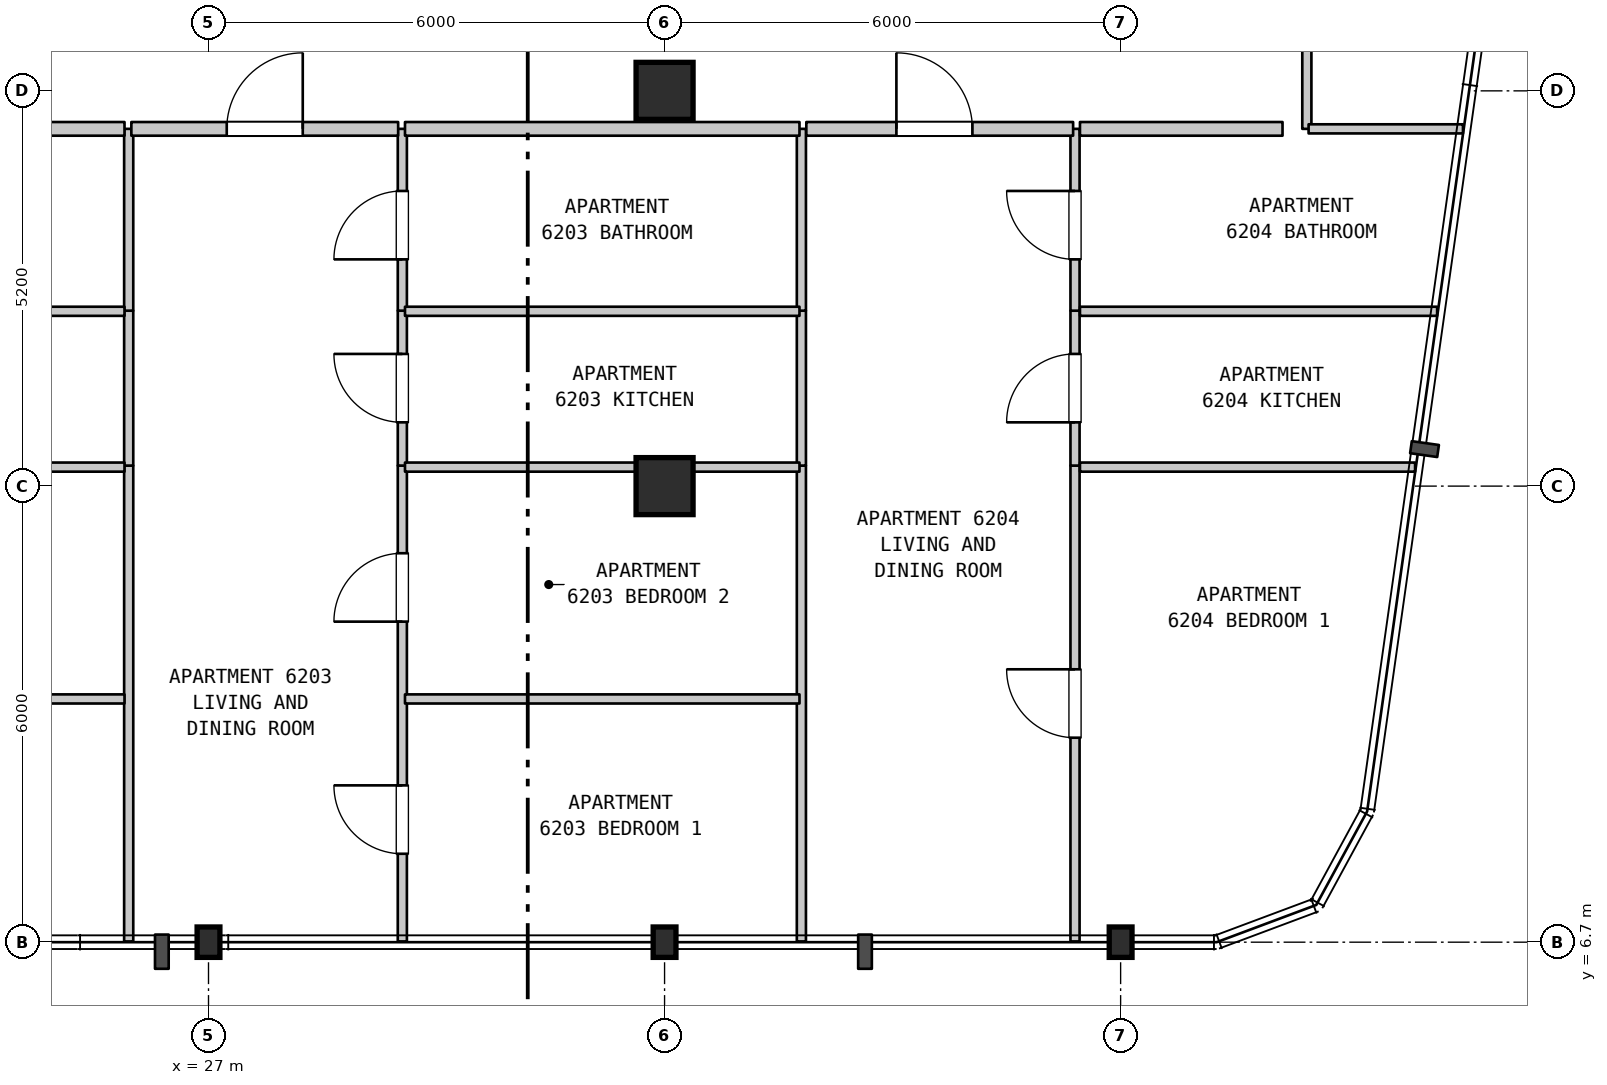
"""IFC4 building model, lengths in metres.
Left out: names, types, materials, properties, quantities, classifications, styles, units other than length and angle.
Written with IfcOpenShell. Run it as: python <this file> out.ifc"""

import sys

from ifc_helpers import new_model, si_unit, direction, frame, frame_2d, origin, origin_2d, place, context, subcontext, project, spatial, rectangle, i_section, extrude, element, fill, save


model = new_model("IFC4")
c1 = context("Model", 3, precision=1e-05, world=origin(), true_north=direction((0.0, 1.0)))
c2 = subcontext(c1, "Body", "Model", "MODEL_VIEW")
j1 = project(units=[si_unit("LENGTHUNIT", "METRE"), si_unit("PLANEANGLEUNIT", "RADIAN")], contexts=[c1])
p1 = place(None, origin())
s1 = spatial("IfcSite", under=j1, at=p1, CompositionType="ELEMENT")
p2 = place(p1, origin())
s2 = spatial("IfcBuilding", under=s1, at=p2, CompositionType="ELEMENT")
p3 = place(p2, frame((0.0, 0.0, 251.0)))
s3 = spatial("IfcBuildingStorey", under=s2, at=p3, CompositionType="ELEMENT", Elevation=251.0)
for number, where, z_axis, x_axis in (
    (1, (27.0, 6.7, 0.0), (0.0, 0.0, 1.0), (1.0, 0.0, 0.0)),
    (2, (33.0, 6.7, 0.0), (0.0, 0.0, 1.0), (1.0, 0.0, 0.0)),
):
    element("IfcColumn", number, at=place(p3, frame(where, z_axis=z_axis, x_axis=x_axis)), inside=s3, PredefinedType="COLUMN", context=c2, shape_type="SweptSolid", body=[
        extrude(i_section(OverallWidth=0.3, OverallDepth=0.4, WebThickness=0.013, FlangeThickness=0.024, FilletRadius=0.027, at=origin_2d()), origin(), (0.0, 0.0, 1.0), 3.7),
    ])
for number, where, z_axis, x_axis in (
    (3, (33.0, 12.7, 0.0), (0.0, 0.0, 1.0), (1.0, 0.0, 0.0)),
    (4, (33.0, 17.9, 0.0), (0.0, 0.0, 1.0), (1.0, 0.0, 0.0)),
):
    element("IfcColumn", number, at=place(p3, frame(where, z_axis=z_axis, x_axis=x_axis)), inside=s3, PredefinedType="COLUMN", context=c2, shape_type="SweptSolid", body=[
        extrude(rectangle(XDim=0.75, YDim=0.75, at=origin_2d()), origin(), (0.0, 0.0, 1.0), 3.7),
    ])
p4 = place(p3, frame((39.0, 6.7, 0.0), z_axis=(0.0, 0.0, 1.0), x_axis=(1.0, 0.0, 0.0)))
e5 = element("IfcColumn", 5, at=p4, inside=s3, PredefinedType="COLUMN", context=c2, shape_type="SweptSolid", body=[
    extrude(i_section(OverallWidth=0.3, OverallDepth=0.4, WebThickness=0.013, FlangeThickness=0.024, FilletRadius=0.027, at=origin_2d()), origin(), (0.0, 0.0, 1.0), 3.7),
])
p5 = place(p3, frame((25.95, 6.71, 0.0), z_axis=(0.0, 0.0, 1.0), x_axis=(0.0, 1.0, 0.0)))
e6 = element("IfcWall", 6, at=p5, inside=s3, PredefinedType="PARTITIONING", context=c2, shape_type="SweptSolid", body=[
    extrude(rectangle(XDim=6.26, YDim=0.12, at=frame_2d((3.13, 0.0))), origin(), (0.0, 0.0, 1.0), 3.39),
])
p6 = place(p3, frame((25.95, 12.97, 0.0), z_axis=(0.0, 0.0, 1.0), x_axis=(0.0, 1.0, 0.0)))
e7 = element("IfcWall", 7, at=p6, inside=s3, PredefinedType="PARTITIONING", context=c2, shape_type="SweptSolid", body=[
    extrude(rectangle(XDim=2.038, YDim=0.12, at=frame_2d((1.019, 0.0))), origin(), (0.0, 0.0, 1.0), 3.39),
])
p7 = place(p3, frame((25.95, 15.008, 0.0), z_axis=(0.0, 0.0, 1.0), x_axis=(0.0, 1.0, 0.0)))
e8 = element("IfcWall", 8, at=p7, inside=s3, PredefinedType="PARTITIONING", context=c2, shape_type="SweptSolid", body=[
    extrude(rectangle(XDim=2.392, YDim=0.12, at=frame_2d((1.196, 0.0))), origin(), (0.0, 0.0, 1.0), 3.39),
])
p8 = place(p3, frame((29.55, 6.71, 0.0), z_axis=(0.0, 0.0, 1.0), x_axis=(0.0, 1.0, 0.0)))
e9 = element("IfcWall", 9, at=p8, inside=s3, PredefinedType="PARTITIONING", context=c2, shape_type="SweptSolid", body=[
    extrude(rectangle(XDim=6.26, YDim=0.12, at=frame_2d((3.13, 0.0))), origin(), (0.0, 0.0, 1.0), 3.39),
])
p9 = place(p8, frame((1.153, 0.0, 0.0)))
e10 = element("IfcOpeningElement", 10, at=p9, cuts=e9, PredefinedType="OPENING", context=c2, shape_type="SweptSolid", body=[
    extrude(rectangle(XDim=0.9, YDim=2.15, at=frame_2d((0.45, 1.075))), frame((0.0, 0.07, 0.0), z_axis=(0.0, -1.0, 0.0), x_axis=(1.0, 0.0, 0.0)), (0.0, 0.0, 1.0), 0.14),
])
p10 = place(p8, frame((4.207, 0.0, 0.0)))
e11 = element("IfcOpeningElement", 11, at=p10, cuts=e9, PredefinedType="OPENING", context=c2, shape_type="SweptSolid", body=[
    extrude(rectangle(XDim=0.9, YDim=2.15, at=frame_2d((0.45, 1.075))), frame((0.0, 0.07, 0.0), z_axis=(0.0, -1.0, 0.0), x_axis=(1.0, 0.0, 0.0)), (0.0, 0.0, 1.0), 0.14),
])
p11 = place(p3, frame((29.55, 12.97, 0.0), z_axis=(0.0, 0.0, 1.0), x_axis=(0.0, 1.0, 0.0)))
e12 = element("IfcWall", 12, at=p11, inside=s3, PredefinedType="PARTITIONING", context=c2, shape_type="SweptSolid", body=[
    extrude(rectangle(XDim=2.038, YDim=0.12, at=frame_2d((1.019, 0.0))), origin(), (0.0, 0.0, 1.0), 3.39),
])
p12 = place(p11, frame((0.569, 0.0, 0.0)))
e13 = element("IfcOpeningElement", 13, at=p12, cuts=e12, PredefinedType="OPENING", context=c2, shape_type="SweptSolid", body=[
    extrude(rectangle(XDim=0.9, YDim=2.15, at=frame_2d((0.45, 1.075))), frame((0.0, 0.07, 0.0), z_axis=(0.0, -1.0, 0.0), x_axis=(1.0, 0.0, 0.0)), (0.0, 0.0, 1.0), 0.14),
])
p13 = place(p3, frame((29.55, 15.008, 0.0), z_axis=(0.0, 0.0, 1.0), x_axis=(0.0, 1.0, 0.0)))
e14 = element("IfcWall", 14, at=p13, inside=s3, PredefinedType="PARTITIONING", context=c2, shape_type="SweptSolid", body=[
    extrude(rectangle(XDim=2.392, YDim=0.12, at=frame_2d((1.196, 0.0))), origin(), (0.0, 0.0, 1.0), 3.39),
])
p14 = place(p13, frame((0.675, 0.0, 0.0)))
e15 = element("IfcOpeningElement", 15, at=p14, cuts=e14, PredefinedType="OPENING", context=c2, shape_type="SweptSolid", body=[
    extrude(rectangle(XDim=0.9, YDim=2.1, at=frame_2d((0.45, 1.05))), frame((0.0, 0.07, 0.0), z_axis=(0.0, -1.0, 0.0), x_axis=(1.0, 0.0, 0.0)), (0.0, 0.0, 1.0), 0.14),
])
p15 = place(p3, frame((34.8, 6.71, 0.0), z_axis=(0.0, 0.0, 1.0), x_axis=(0.0, 1.0, 0.0)))
e16 = element("IfcWall", 16, at=p15, inside=s3, PredefinedType="PARTITIONING", context=c2, shape_type="SweptSolid", body=[
    extrude(rectangle(XDim=6.26, YDim=0.12, at=frame_2d((3.13, 0.0))), origin(), (0.0, 0.0, 1.0), 3.39),
])
p16 = place(p3, frame((34.8, 12.97, 0.0), z_axis=(0.0, 0.0, 1.0), x_axis=(0.0, 1.0, 0.0)))
e17 = element("IfcWall", 17, at=p16, inside=s3, PredefinedType="PARTITIONING", context=c2, shape_type="SweptSolid", body=[
    extrude(rectangle(XDim=2.038, YDim=0.12, at=frame_2d((1.019, 0.0))), origin(), (0.0, 0.0, 1.0), 3.39),
])
p17 = place(p3, frame((34.8, 15.008, 0.0), z_axis=(0.0, 0.0, 1.0), x_axis=(0.0, 1.0, 0.0)))
e18 = element("IfcWall", 18, at=p17, inside=s3, PredefinedType="PARTITIONING", context=c2, shape_type="SweptSolid", body=[
    extrude(rectangle(XDim=2.392, YDim=0.12, at=frame_2d((1.196, 0.0))), origin(), (0.0, 0.0, 1.0), 3.39),
])
p18 = place(p3, frame((38.4, 6.71, 0.0), z_axis=(0.0, 0.0, 1.0), x_axis=(0.0, 1.0, 0.0)))
e19 = element("IfcWall", 19, at=p18, inside=s3, PredefinedType="PARTITIONING", context=c2, shape_type="SweptSolid", body=[
    extrude(rectangle(XDim=6.26, YDim=0.12, at=frame_2d((3.13, 0.0))), origin(), (0.0, 0.0, 1.0), 3.39),
])
p19 = place(p18, frame((2.68, 0.0, 0.0)))
e20 = element("IfcOpeningElement", 20, at=p19, cuts=e19, PredefinedType="OPENING", context=c2, shape_type="SweptSolid", body=[
    extrude(rectangle(XDim=0.9, YDim=2.15, at=frame_2d((0.45, 1.075))), frame((0.0, 0.07, 0.0), z_axis=(0.0, -1.0, 0.0), x_axis=(1.0, 0.0, 0.0)), (0.0, 0.0, 1.0), 0.14),
])
p20 = place(p3, frame((38.4, 12.97, 0.0), z_axis=(0.0, 0.0, 1.0), x_axis=(0.0, 1.0, 0.0)))
e21 = element("IfcWall", 21, at=p20, inside=s3, PredefinedType="PARTITIONING", context=c2, shape_type="SweptSolid", body=[
    extrude(rectangle(XDim=2.038, YDim=0.12, at=frame_2d((1.019, 0.0))), origin(), (0.0, 0.0, 1.0), 3.39),
])
p21 = place(p20, frame((0.569, 0.0, 0.0)))
e22 = element("IfcOpeningElement", 22, at=p21, cuts=e21, PredefinedType="OPENING", context=c2, shape_type="SweptSolid", body=[
    extrude(rectangle(XDim=0.9, YDim=2.15, at=frame_2d((0.45, 1.075))), frame((0.0, 0.07, 0.0), z_axis=(0.0, -1.0, 0.0), x_axis=(1.0, 0.0, 0.0)), (0.0, 0.0, 1.0), 0.14),
])
p22 = place(p3, frame((38.4, 15.008, 0.0), z_axis=(0.0, 0.0, 1.0), x_axis=(0.0, 1.0, 0.0)))
e23 = element("IfcWall", 23, at=p22, inside=s3, PredefinedType="PARTITIONING", context=c2, shape_type="SweptSolid", body=[
    extrude(rectangle(XDim=2.392, YDim=0.12, at=frame_2d((1.196, 0.0))), origin(), (0.0, 0.0, 1.0), 3.39),
])
p23 = place(p22, frame((0.675, 0.0, 0.0)))
e24 = element("IfcOpeningElement", 24, at=p23, cuts=e23, PredefinedType="OPENING", context=c2, shape_type="SweptSolid", body=[
    extrude(rectangle(XDim=0.9, YDim=2.1, at=frame_2d((0.45, 1.05))), frame((0.0, 0.07, 0.0), z_axis=(0.0, -1.0, 0.0), x_axis=(1.0, 0.0, 0.0)), (0.0, 0.0, 1.0), 0.14),
])
p24 = place(p3, frame((41.45, 17.4, 0.0), z_axis=(0.0, 0.0, 1.0), x_axis=(0.0, 1.0, 0.0)))
e25 = element("IfcWall", 25, at=p24, inside=s3, PredefinedType="PARTITIONING", context=c2, shape_type="SweptSolid", body=[
    extrude(rectangle(XDim=2.099, YDim=0.12, at=frame_2d((1.05, 0.0))), origin(), (0.0, 0.0, 1.0), 3.39),
])
p25 = place(p3, frame((21.045, 9.9, 0.0), z_axis=(0.0, 0.0, 1.0), x_axis=(1.0, 0.0, 0.0)))
e26 = element("IfcWall", 26, at=p25, inside=s3, PredefinedType="PARTITIONING", context=c2, shape_type="SweptSolid", body=[
    extrude(rectangle(XDim=4.85, YDim=0.12, at=frame_2d((2.425, 0.0))), origin(), (0.0, 0.0, 1.0), 3.39),
])
p26 = place(p3, frame((29.585, 9.9, 0.0), z_axis=(0.0, 0.0, 1.0), x_axis=(1.0, 0.0, 0.0)))
e27 = element("IfcWall", 27, at=p26, inside=s3, PredefinedType="PARTITIONING", context=c2, shape_type="SweptSolid", body=[
    extrude(rectangle(XDim=5.19, YDim=0.12, at=frame_2d((2.595, 0.0))), origin(), (0.0, 0.0, 1.0), 3.39),
])
p27 = place(p3, frame((21.045, 12.95, 0.0), z_axis=(0.0, 0.0, 1.0), x_axis=(1.0, 0.0, 0.0)))
e28 = element("IfcWall", 28, at=p27, inside=s3, PredefinedType="PARTITIONING", context=c2, shape_type="SweptSolid", body=[
    extrude(rectangle(XDim=4.85, YDim=0.12, at=frame_2d((2.425, 0.0))), origin(), (0.0, 0.0, 1.0), 3.39),
])
p28 = place(p3, frame((29.585, 12.95, 0.0), z_axis=(0.0, 0.0, 1.0), x_axis=(1.0, 0.0, 0.0)))
e29 = element("IfcWall", 29, at=p28, inside=s3, PredefinedType="PARTITIONING", context=c2, shape_type="SweptSolid", body=[
    extrude(rectangle(XDim=5.19, YDim=0.12, at=frame_2d((2.595, 0.0))), origin(), (0.0, 0.0, 1.0), 3.39),
])
p29 = place(p3, frame((38.465, 12.95, 0.0), z_axis=(0.0, 0.0, 1.0), x_axis=(1.0, 0.0, 0.0)))
e30 = element("IfcWall", 30, at=p29, inside=s3, PredefinedType="PARTITIONING", context=c2, shape_type="SweptSolid", body=[
    extrude(rectangle(XDim=4.409, YDim=0.12, at=frame_2d((2.205, 0.0))), origin(), (0.0, 0.0, 1.0), 3.39),
])
p30 = place(p3, frame((21.045, 15.0, 0.0), z_axis=(0.0, 0.0, 1.0), x_axis=(1.0, 0.0, 0.0)))
e31 = element("IfcWall", 31, at=p30, inside=s3, PredefinedType="PARTITIONING", context=c2, shape_type="SweptSolid", body=[
    extrude(rectangle(XDim=4.85, YDim=0.12, at=frame_2d((2.425, 0.0))), origin(), (0.0, 0.0, 1.0), 3.39),
])
p31 = place(p3, frame((29.585, 15.0, 0.0), z_axis=(0.0, 0.0, 1.0), x_axis=(1.0, 0.0, 0.0)))
e32 = element("IfcWall", 32, at=p31, inside=s3, PredefinedType="PARTITIONING", context=c2, shape_type="SweptSolid", body=[
    extrude(rectangle(XDim=5.19, YDim=0.12, at=frame_2d((2.595, 0.0))), origin(), (0.0, 0.0, 1.0), 3.39),
])
p32 = place(p3, frame((38.465, 15.0, 0.0), z_axis=(0.0, 0.0, 1.0), x_axis=(1.0, 0.0, 0.0)))
e33 = element("IfcWall", 33, at=p32, inside=s3, PredefinedType="PARTITIONING", context=c2, shape_type="SweptSolid", body=[
    extrude(rectangle(XDim=4.699, YDim=0.12, at=frame_2d((2.35, 0.0))), origin(), (0.0, 0.0, 1.0), 3.39),
])
p33 = place(p3, frame((21.045, 17.4, 0.0), z_axis=(0.0, 0.0, 1.0), x_axis=(1.0, 0.0, 0.0)))
e34 = element("IfcWall", 34, at=p33, inside=s3, PredefinedType="STANDARD", context=c2, shape_type="SweptSolid", body=[
    extrude(rectangle(XDim=4.85, YDim=0.18, at=frame_2d((2.425, 0.0))), origin(), (0.0, 0.0, 1.0), 3.39),
])
p34 = place(p3, frame((25.985, 17.4, 0.0), z_axis=(0.0, 0.0, 1.0), x_axis=(1.0, 0.0, 0.0)))
e35 = element("IfcWall", 35, at=p34, inside=s3, PredefinedType="STANDARD", context=c2, shape_type="SweptSolid", body=[
    extrude(rectangle(XDim=3.51, YDim=0.18, at=frame_2d((1.755, 0.0))), origin(), (0.0, 0.0, 1.0), 3.39),
])
p35 = place(p34, frame((1.255, 0.0, 0.0)))
e36 = element("IfcOpeningElement", 36, at=p35, cuts=e35, PredefinedType="OPENING", context=c2, shape_type="SweptSolid", body=[
    extrude(rectangle(XDim=1.0, YDim=2.15, at=frame_2d((0.5, 1.075))), frame((0.0, 0.1, 0.0), z_axis=(0.0, -1.0, 0.0), x_axis=(1.0, 0.0, 0.0)), (0.0, 0.0, 1.0), 0.2),
])
p36 = place(p3, frame((29.585, 17.4, 0.0), z_axis=(0.0, 0.0, 1.0), x_axis=(1.0, 0.0, 0.0)))
e37 = element("IfcWall", 37, at=p36, inside=s3, PredefinedType="STANDARD", context=c2, shape_type="SweptSolid", body=[
    extrude(rectangle(XDim=5.19, YDim=0.18, at=frame_2d((2.595, 0.0))), origin(), (0.0, 0.0, 1.0), 3.39),
])
p37 = place(p3, frame((34.865, 17.4, 0.0), z_axis=(0.0, 0.0, 1.0), x_axis=(1.0, 0.0, 0.0)))
e38 = element("IfcWall", 38, at=p37, inside=s3, PredefinedType="STANDARD", context=c2, shape_type="SweptSolid", body=[
    extrude(rectangle(XDim=3.51, YDim=0.18, at=frame_2d((1.755, 0.0))), origin(), (0.0, 0.0, 1.0), 3.39),
])
p38 = place(p37, frame((1.185, 0.0, 0.0)))
e39 = element("IfcOpeningElement", 39, at=p38, cuts=e38, PredefinedType="OPENING", context=c2, shape_type="SweptSolid", body=[
    extrude(rectangle(XDim=1.0, YDim=2.15, at=frame_2d((0.5, 1.075))), frame((0.0, 0.1, 0.0), z_axis=(0.0, -1.0, 0.0), x_axis=(1.0, 0.0, 0.0)), (0.0, 0.0, 1.0), 0.2),
])
p39 = place(p3, frame((38.465, 17.4, 0.0), z_axis=(0.0, 0.0, 1.0), x_axis=(1.0, 0.0, 0.0)))
e40 = element("IfcWall", 40, at=p39, inside=s3, PredefinedType="STANDARD", context=c2, shape_type="SweptSolid", body=[
    extrude(rectangle(XDim=2.665, YDim=0.18, at=frame_2d((1.333, 0.0))), origin(), (0.0, 0.0, 1.0), 3.39),
])
p40 = place(p3, frame((41.473, 17.4, 0.0), z_axis=(0.0, 0.0, 1.0), x_axis=(1.0, 0.0, 0.0)))
e41 = element("IfcWall", 41, at=p40, inside=s3, PredefinedType="PARTITIONING", context=c2, shape_type="SweptSolid", body=[
    extrude(rectangle(XDim=2.031, YDim=0.12, at=frame_2d((1.016, 0.0))), origin(), (0.0, 0.0, 1.0), 3.39),
])
p41 = place(p9, origin())
e42 = element("IfcDoor", 42, at=p41, inside=s3, OperationType="SINGLE_SWING_RIGHT", PredefinedType="DOOR", context=c2, shape_type="SweptSolid", body=[
    extrude(rectangle(XDim=0.9, YDim=2.15, at=frame_2d((0.45, 1.075))), frame((0.0, 0.025, 0.0), z_axis=(0.0, -1.0, 0.0), x_axis=(1.0, 0.0, 0.0)), (0.0, 0.0, 1.0), 0.05),
])
fill(e10, e42)
p42 = place(p10, origin())
e43 = element("IfcDoor", 43, at=p42, inside=s3, OperationType="SINGLE_SWING_LEFT", PredefinedType="DOOR", context=c2, shape_type="SweptSolid", body=[
    extrude(rectangle(XDim=0.9, YDim=2.15, at=frame_2d((0.45, 1.075))), frame((0.0, 0.025, 0.0), z_axis=(0.0, -1.0, 0.0), x_axis=(1.0, 0.0, 0.0)), (0.0, 0.0, 1.0), 0.05),
])
fill(e11, e43)
p43 = place(p12, origin())
e44 = element("IfcDoor", 44, at=p43, inside=s3, OperationType="SINGLE_SWING_RIGHT", PredefinedType="DOOR", context=c2, shape_type="SweptSolid", body=[
    extrude(rectangle(XDim=0.9, YDim=2.15, at=frame_2d((0.45, 1.075))), frame((0.0, 0.025, 0.0), z_axis=(0.0, -1.0, 0.0), x_axis=(1.0, 0.0, 0.0)), (0.0, 0.0, 1.0), 0.05),
])
fill(e13, e44)
p44 = place(p14, origin())
e45 = element("IfcDoor", 45, at=p44, inside=s3, OperationType="SINGLE_SWING_LEFT", PredefinedType="DOOR", context=c2, shape_type="SweptSolid", body=[
    extrude(rectangle(XDim=0.9, YDim=2.1, at=frame_2d((0.45, 1.05))), frame((0.0, 0.025, 0.0), z_axis=(0.0, -1.0, 0.0), x_axis=(1.0, 0.0, 0.0)), (0.0, 0.0, 1.0), 0.05),
])
fill(e15, e45)
p45 = place(p19, origin())
e46 = element("IfcDoor", 46, at=p45, inside=s3, OperationType="SINGLE_SWING_RIGHT", PredefinedType="DOOR", context=c2, shape_type="SweptSolid", body=[
    extrude(rectangle(XDim=0.9, YDim=2.15, at=frame_2d((0.45, 1.075))), frame((0.0, 0.025, 0.0), z_axis=(0.0, -1.0, 0.0), x_axis=(1.0, 0.0, 0.0)), (0.0, 0.0, 1.0), 0.05),
])
fill(e20, e46)
p46 = place(p21, origin())
e47 = element("IfcDoor", 47, at=p46, inside=s3, OperationType="SINGLE_SWING_LEFT", PredefinedType="DOOR", context=c2, shape_type="SweptSolid", body=[
    extrude(rectangle(XDim=0.9, YDim=2.15, at=frame_2d((0.45, 1.075))), frame((0.0, 0.025, 0.0), z_axis=(0.0, -1.0, 0.0), x_axis=(1.0, 0.0, 0.0)), (0.0, 0.0, 1.0), 0.05),
])
fill(e22, e47)
p47 = place(p23, origin())
e48 = element("IfcDoor", 48, at=p47, inside=s3, OperationType="SINGLE_SWING_RIGHT", PredefinedType="DOOR", context=c2, shape_type="SweptSolid", body=[
    extrude(rectangle(XDim=0.9, YDim=2.1, at=frame_2d((0.45, 1.05))), frame((0.0, 0.025, 0.0), z_axis=(0.0, -1.0, 0.0), x_axis=(1.0, 0.0, 0.0)), (0.0, 0.0, 1.0), 0.05),
])
fill(e24, e48)
p48 = place(p35, origin())
e49 = element("IfcDoor", 49, at=p48, inside=s3, OperationType="SINGLE_SWING_RIGHT", PredefinedType="DOOR", context=c2, shape_type="SweptSolid", body=[
    extrude(rectangle(XDim=1.0, YDim=2.15, at=frame_2d((0.5, 1.075))), frame((0.0, 0.025, 0.0), z_axis=(0.0, -1.0, 0.0), x_axis=(1.0, 0.0, 0.0)), (0.0, 0.0, 1.0), 0.05),
])
fill(e36, e49)
p49 = place(p38, origin())
e50 = element("IfcDoor", 50, at=p49, inside=s3, OperationType="SINGLE_SWING_LEFT", PredefinedType="DOOR", context=c2, shape_type="SweptSolid", body=[
    extrude(rectangle(XDim=1.0, YDim=2.15, at=frame_2d((0.5, 1.075))), frame((0.0, 0.025, 0.0), z_axis=(0.0, -1.0, 0.0), x_axis=(1.0, 0.0, 0.0)), (0.0, 0.0, 1.0), 0.05),
])
fill(e39, e50)
save(model, sys.argv[1])
